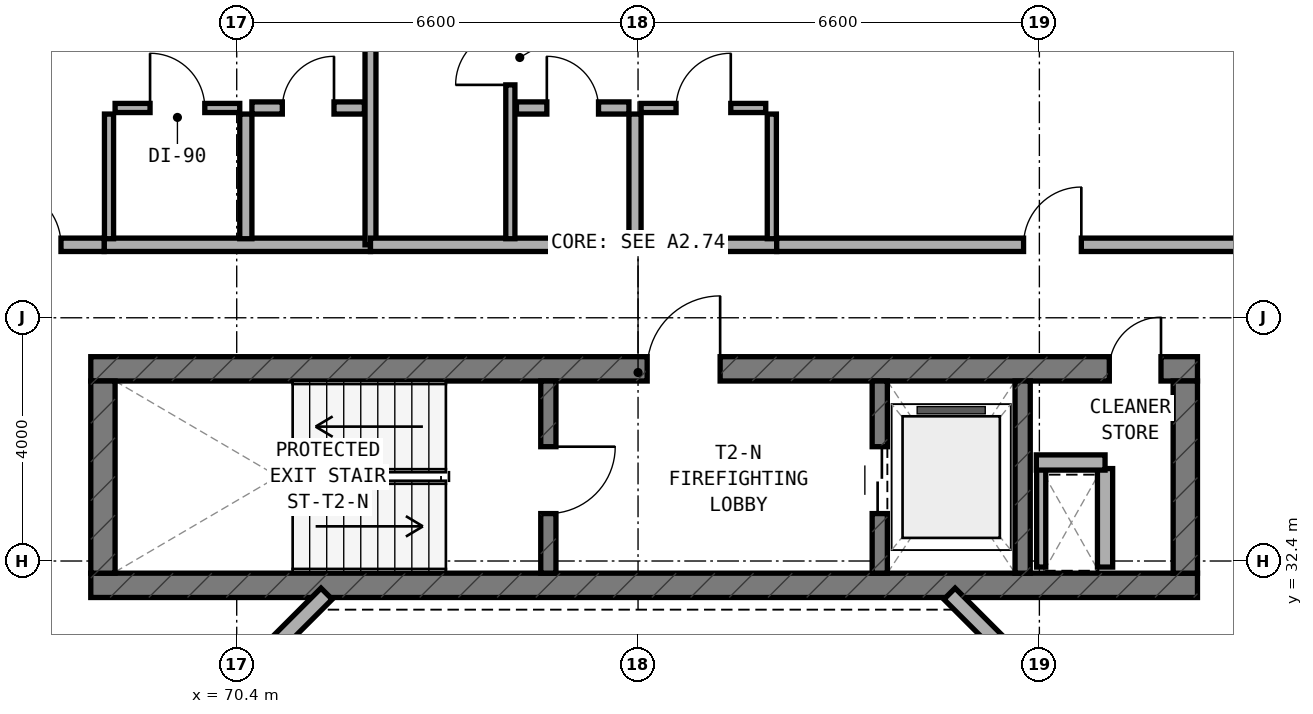
"""IFC4 building model, lengths in metres.
Left out: names, types, materials, properties, quantities, classifications, styles, units other than length and angle.
Written with IfcOpenShell. Run it as: python <this file> out.ifc"""

import sys

from ifc_helpers import new_model, si_unit, direction, frame, frame_2d, origin, place, context, subcontext, project, spatial, rectangle, extrude, element, fill, save


model = new_model("IFC4")
c1 = context("Model", 3, precision=1e-05, world=origin(), true_north=direction((0.0, 1.0)))
c2 = subcontext(c1, "Body", "Model", "MODEL_VIEW")
j1 = project(units=[si_unit("LENGTHUNIT", "METRE"), si_unit("PLANEANGLEUNIT", "RADIAN")], contexts=[c1])
p1 = place(None, origin())
s1 = spatial("IfcSite", under=j1, at=p1, CompositionType="ELEMENT")
p2 = place(p1, origin())
s2 = spatial("IfcBuilding", under=s1, at=p2, CompositionType="ELEMENT")
p3 = place(p2, frame((0.0, 0.0, 112.5)))
s3 = spatial("IfcBuildingStorey", under=s2, at=p3, CompositionType="ELEMENT", Elevation=112.5)
p4 = place(p3, frame((68.0, 32.0, 0.0), z_axis=(0.0, 0.0, 1.0), x_axis=(1.0, 0.0, 0.0)))
e1 = element("IfcWall", 1, at=p4, inside=s3, PredefinedType="SHEAR", context=c2, shape_type="SweptSolid", body=[
    extrude(rectangle(XDim=18.2, YDim=0.4, at=frame_2d((9.1, 0.0))), origin(), (0.0, 0.0, 1.0), 3.5),
])
p5 = place(p3, frame((68.0, 35.56, 0.0), z_axis=(0.0, 0.0, 1.0), x_axis=(1.0, 0.0, 0.0)))
e2 = element("IfcWall", 2, at=p5, inside=s3, PredefinedType="SHEAR", context=c2, shape_type="SweptSolid", body=[
    extrude(rectangle(XDim=18.2, YDim=0.4, at=frame_2d((9.1, 0.0))), origin(), (0.0, 0.0, 1.0), 3.5),
])
p6 = place(p5, frame((9.15, 0.0, 0.0)))
e3 = element("IfcOpeningElement", 3, at=p6, cuts=e2, PredefinedType="OPENING", context=c2, shape_type="SweptSolid", body=[
    extrude(rectangle(XDim=1.2, YDim=2.15, at=frame_2d((0.6, 1.075))), frame((0.0, 0.21, 0.0), z_axis=(0.0, -1.0, 0.0), x_axis=(1.0, 0.0, 0.0)), (0.0, 0.0, 1.0), 0.42),
])
p7 = place(p5, frame((16.75, 0.0, 0.0)))
e4 = element("IfcOpeningElement", 4, at=p7, cuts=e2, PredefinedType="OPENING", context=c2, shape_type="SweptSolid", body=[
    extrude(rectangle(XDim=0.85, YDim=2.1, at=frame_2d((0.425, 1.05))), frame((0.0, 0.21, 0.0), z_axis=(0.0, -1.0, 0.0), x_axis=(1.0, 0.0, 0.0)), (0.0, 0.0, 1.0), 0.42),
])
for number, where, z_axis, x_axis in (
    (5, (68.2, 32.2, 0.0), (0.0, 0.0, 1.0), (0.0, 1.0, 0.0)),
    (6, (86.0, 32.2, 0.0), (0.0, 0.0, 1.0), (0.0, 1.0, 0.0)),
):
    element("IfcWall", number, at=place(p3, frame(where, z_axis=z_axis, x_axis=x_axis)), inside=s3, PredefinedType="SHEAR", context=c2, shape_type="SweptSolid", body=[
        extrude(rectangle(XDim=3.16, YDim=0.4, at=frame_2d((1.58, 0.0))), origin(), (0.0, 0.0, 1.0), 3.5),
    ])
p8 = place(p3, frame((75.525, 32.2, 0.0), z_axis=(0.0, 0.0, 1.0), x_axis=(0.0, 1.0, 0.0)))
e7 = element("IfcWall", 7, at=p8, inside=s3, PredefinedType="STANDARD", context=c2, shape_type="SweptSolid", body=[
    extrude(rectangle(XDim=3.16, YDim=0.25, at=frame_2d((1.58, 0.0))), origin(), (0.0, 0.0, 1.0), 3.25),
])
p9 = place(p8, frame((0.98, 0.0, 0.0)))
e8 = element("IfcOpeningElement", 8, at=p9, cuts=e7, PredefinedType="OPENING", context=c2, shape_type="SweptSolid", body=[
    extrude(rectangle(XDim=1.1, YDim=2.15, at=frame_2d((0.55, 1.075))), frame((0.0, 0.135, 0.0), z_axis=(0.0, -1.0, 0.0), x_axis=(1.0, 0.0, 0.0)), (0.0, 0.0, 1.0), 0.27),
])
p10 = place(p3, frame((80.975, 32.2, 0.0), z_axis=(0.0, 0.0, 1.0), x_axis=(0.0, 1.0, 0.0)))
e9 = element("IfcWall", 9, at=p10, inside=s3, PredefinedType="STANDARD", context=c2, shape_type="SweptSolid", body=[
    extrude(rectangle(XDim=3.16, YDim=0.25, at=frame_2d((1.58, 0.0))), origin(), (0.0, 0.0, 1.0), 3.25),
])
p11 = place(p10, frame((0.98, 0.0, 0.0)))
e10 = element("IfcOpeningElement", 10, at=p11, cuts=e9, PredefinedType="OPENING", context=c2, shape_type="SweptSolid", body=[
    extrude(rectangle(XDim=1.1, YDim=2.15, at=frame_2d((0.55, 1.075))), frame((0.0, 0.135, 0.0), z_axis=(0.0, -1.0, 0.0), x_axis=(1.0, 0.0, 0.0)), (0.0, 0.0, 1.0), 0.27),
])
p12 = place(p3, frame((83.325, 32.2, 0.0), z_axis=(0.0, 0.0, 1.0), x_axis=(0.0, 1.0, 0.0)))
e11 = element("IfcWall", 11, at=p12, inside=s3, PredefinedType="STANDARD", context=c2, shape_type="SweptSolid", body=[
    extrude(rectangle(XDim=3.16, YDim=0.25, at=frame_2d((1.58, 0.0))), origin(), (0.0, 0.0, 1.0), 3.25),
])
for number, where, z_axis, x_axis in (
    (12, (83.756, 30.228, 0.0), (0.0, 0.0, 1.0), (-0.707, 0.707, 0.0)),
    (13, (71.878, 31.862, 0.0), (0.0, 0.0, 1.0), (-0.707, -0.707, 0.0)),
):
    element("IfcWall", number, at=place(p3, frame(where, z_axis=z_axis, x_axis=x_axis)), inside=s3, PredefinedType="STANDARD", context=c2, shape_type="SweptSolid", body=[
        extrude(rectangle(XDim=2.311, YDim=0.26, at=frame_2d((1.155, 0.0))), origin(), (0.0, 0.0, 1.0), 3.25),
    ])
p13 = place(p3, frame((83.63, 32.3, 0.0), z_axis=(0.0, 0.0, 1.0), x_axis=(0.0, 1.0, 0.0)))
e14 = element("IfcWall", 14, at=p13, inside=s3, PredefinedType="PARTITIONING", context=c2, shape_type="SweptSolid", body=[
    extrude(rectangle(XDim=1.62, YDim=0.15, at=frame_2d((0.81, 0.0))), origin(), (0.0, 0.0, 1.0), 2.825),
])
p14 = place(p3, frame((84.68, 32.3, 0.0), z_axis=(0.0, 0.0, 1.0), x_axis=(0.0, 1.0, 0.0)))
e15 = element("IfcWall", 15, at=p14, inside=s3, PredefinedType="SOLIDWALL", context=c2, shape_type="SweptSolid", body=[
    extrude(rectangle(XDim=1.62, YDim=0.25, at=frame_2d((0.81, 0.0))), origin(), (0.0, 0.0, 1.0), 3.22),
])
p15 = place(p3, frame((83.55, 34.02, 0.0), z_axis=(0.0, 0.0, 1.0), x_axis=(1.0, 0.0, 0.0)))
e16 = element("IfcWall", 16, at=p15, inside=s3, PredefinedType="SOLIDWALL", context=c2, shape_type="SweptSolid", body=[
    extrude(rectangle(XDim=1.13, YDim=0.25, at=frame_2d((0.565, 0.0))), origin(), (0.0, 0.0, 1.0), 3.22),
])
p16 = place(p3, frame((68.22, 37.6, 0.0), z_axis=(0.0, 0.0, 1.0), x_axis=(1.0, 0.0, 0.0)))
e17 = element("IfcWall", 17, at=p16, inside=s3, PredefinedType="SOLIDWALL", context=c2, shape_type="SweptSolid", body=[
    extrude(rectangle(XDim=4.38, YDim=0.22, at=frame_2d((2.19, 0.0))), origin(), (0.0, 0.0, 1.0), 2.825),
])
p17 = place(p3, frame((65.85, 37.6, 0.0), z_axis=(0.0, 0.0, 1.0), x_axis=(1.0, 0.0, 0.0)))
e18 = element("IfcWall", 18, at=p17, inside=s3, PredefinedType="SOLIDWALL", context=c2, shape_type="SweptSolid", body=[
    extrude(rectangle(XDim=2.37, YDim=0.22, at=frame_2d((1.185, 0.0))), origin(), (0.0, 0.0, 1.0), 3.22),
])
p18 = place(p17, frame((0.71, 0.0, 0.0)))
e19 = element("IfcOpeningElement", 19, at=p18, cuts=e18, PredefinedType="OPENING", context=c2, shape_type="SweptSolid", body=[
    extrude(rectangle(XDim=0.95, YDim=2.1, at=frame_2d((0.475, 1.05))), frame((0.0, 0.12, 0.0), z_axis=(0.0, -1.0, 0.0), x_axis=(1.0, 0.0, 0.0)), (0.0, 0.0, 1.0), 0.24),
])
p19 = place(p3, frame((70.55, 37.7, 0.0), z_axis=(0.0, 0.0, 1.0), x_axis=(0.0, 1.0, 0.0)))
e20 = element("IfcWall", 20, at=p19, inside=s3, PredefinedType="PLUMBINGWALL", context=c2, shape_type="SweptSolid", body=[
    extrude(rectangle(XDim=2.05, YDim=0.2, at=frame_2d((1.025, 0.0))), origin(), (0.0, 0.0, 1.0), 3.22),
])
p20 = place(p3, frame((68.3, 37.7, 0.0), z_axis=(0.0, 0.0, 1.0), x_axis=(0.0, 1.0, 0.0)))
e21 = element("IfcWall", 21, at=p20, inside=s3, PredefinedType="PARTITIONING", context=c2, shape_type="SweptSolid", body=[
    extrude(rectangle(XDim=2.05, YDim=0.15, at=frame_2d((1.025, 0.0))), origin(), (0.0, 0.0, 1.0), 3.22),
])
p21 = place(p3, frame((70.65, 39.85, 0.0), z_axis=(0.0, 0.0, 1.0), x_axis=(1.0, 0.0, 0.0)))
e22 = element("IfcWall", 22, at=p21, inside=s3, PredefinedType="PLUMBINGWALL", context=c2, shape_type="SweptSolid", body=[
    extrude(rectangle(XDim=1.85, YDim=0.2, at=frame_2d((0.925, 0.0))), origin(), (0.0, 0.0, 1.0), 3.22),
])
p22 = place(p21, frame((0.5, 0.0, 0.0)))
e23 = element("IfcOpeningElement", 23, at=p22, cuts=e22, PredefinedType="OPENING", context=c2, shape_type="SweptSolid", body=[
    extrude(rectangle(XDim=0.85, YDim=2.1, at=frame_2d((0.425, 1.05))), frame((0.0, 0.11, 0.0), z_axis=(0.0, -1.0, 0.0), x_axis=(1.0, 0.0, 0.0)), (0.0, 0.0, 1.0), 0.22),
])
p23 = place(p3, frame((68.4, 39.85, 0.0), z_axis=(0.0, 0.0, 1.0), x_axis=(1.0, 0.0, 0.0)))
e24 = element("IfcWall", 24, at=p23, inside=s3, PredefinedType="PARTITIONING", context=c2, shape_type="SweptSolid", body=[
    extrude(rectangle(XDim=2.05, YDim=0.15, at=frame_2d((1.025, 0.0))), origin(), (0.0, 0.0, 1.0), 3.22),
])
p24 = place(p23, frame((0.575, 0.0, 0.0)))
e25 = element("IfcOpeningElement", 25, at=p24, cuts=e24, PredefinedType="OPENING", context=c2, shape_type="SweptSolid", body=[
    extrude(rectangle(XDim=0.9, YDim=2.1, at=frame_2d((0.45, 1.05))), frame((0.0, 0.085, 0.0), z_axis=(0.0, -1.0, 0.0), x_axis=(1.0, 0.0, 0.0)), (0.0, 0.0, 1.0), 0.17),
])
p25 = place(p3, frame((72.6, 37.6, 0.0), z_axis=(0.0, 0.0, 1.0), x_axis=(0.0, 1.0, 0.0)))
e26 = element("IfcWall", 26, at=p25, inside=s3, PredefinedType="SOLIDWALL", context=c2, shape_type="SweptSolid", body=[
    extrude(rectangle(XDim=5.74, YDim=0.18, at=frame_2d((2.87, 0.0))), origin(), (0.0, 0.0, 1.0), 2.825),
])
p26 = place(p3, frame((72.6, 37.6, 0.0), z_axis=(0.0, 0.0, 1.0), x_axis=(1.0, 0.0, 0.0)))
e27 = element("IfcWall", 27, at=p26, inside=s3, PredefinedType="SOLIDWALL", context=c2, shape_type="SweptSolid", body=[
    extrude(rectangle(XDim=6.68, YDim=0.22, at=frame_2d((3.34, 0.0))), origin(), (0.0, 0.0, 1.0), 2.825),
])
p27 = place(p3, frame((79.28, 37.6, 0.0), z_axis=(0.0, 0.0, 1.0), x_axis=(1.0, 0.0, 0.0)))
e28 = element("IfcWall", 28, at=p27, inside=s3, PredefinedType="SOLIDWALL", context=c2, shape_type="SweptSolid", body=[
    extrude(rectangle(XDim=9.07, YDim=0.22, at=frame_2d((4.535, 0.0))), origin(), (0.0, 0.0, 1.0), 2.825),
])
p28 = place(p27, frame((4.06, 0.0, 0.0)))
e29 = element("IfcOpeningElement", 29, at=p28, cuts=e28, PredefinedType="OPENING", context=c2, shape_type="SweptSolid", body=[
    extrude(rectangle(XDim=0.95, YDim=2.1, at=frame_2d((0.475, 1.05))), frame((0.0, 0.12, 0.0), z_axis=(0.0, -1.0, 0.0), x_axis=(1.0, 0.0, 0.0)), (0.0, 0.0, 1.0), 0.24),
])
p29 = place(p3, frame((74.9, 37.7, 0.0), z_axis=(0.0, 0.0, 1.0), x_axis=(0.0, 1.0, 0.0)))
e30 = element("IfcWall", 30, at=p29, inside=s3, PredefinedType="PARTITIONING", context=c2, shape_type="SweptSolid", body=[
    extrude(rectangle(XDim=5.54, YDim=0.15, at=frame_2d((2.77, 0.0))), origin(), (0.0, 0.0, 1.0), 2.895),
])
p30 = place(p29, frame((2.53, 0.0, 0.0)))
e31 = element("IfcOpeningElement", 31, at=p30, cuts=e30, PredefinedType="OPENING", context=c2, shape_type="SweptSolid", body=[
    extrude(rectangle(XDim=0.9, YDim=2.1, at=frame_2d((0.45, 1.05))), frame((0.0, 0.085, 0.0), z_axis=(0.0, -1.0, 0.0), x_axis=(1.0, 0.0, 0.0)), (0.0, 0.0, 1.0), 0.17),
])
p31 = place(p3, frame((76.95, 37.7, 0.0), z_axis=(0.0, 0.0, 1.0), x_axis=(0.0, 1.0, 0.0)))
e32 = element("IfcWall", 32, at=p31, inside=s3, PredefinedType="PLUMBINGWALL", context=c2, shape_type="SweptSolid", body=[
    extrude(rectangle(XDim=2.05, YDim=0.2, at=frame_2d((1.025, 0.0))), origin(), (0.0, 0.0, 1.0), 2.895),
])
p32 = place(p3, frame((79.2, 37.7, 0.0), z_axis=(0.0, 0.0, 1.0), x_axis=(0.0, 1.0, 0.0)))
e33 = element("IfcWall", 33, at=p32, inside=s3, PredefinedType="PARTITIONING", context=c2, shape_type="SweptSolid", body=[
    extrude(rectangle(XDim=2.05, YDim=0.15, at=frame_2d((1.025, 0.0))), origin(), (0.0, 0.0, 1.0), 2.895),
])
p33 = place(p3, frame((75.0, 39.85, 0.0), z_axis=(0.0, 0.0, 1.0), x_axis=(1.0, 0.0, 0.0)))
e34 = element("IfcWall", 34, at=p33, inside=s3, PredefinedType="PLUMBINGWALL", context=c2, shape_type="SweptSolid", body=[
    extrude(rectangle(XDim=1.85, YDim=0.2, at=frame_2d((0.925, 0.0))), origin(), (0.0, 0.0, 1.0), 3.22),
])
p34 = place(p33, frame((0.5, 0.0, 0.0)))
e35 = element("IfcOpeningElement", 35, at=p34, cuts=e34, PredefinedType="OPENING", context=c2, shape_type="SweptSolid", body=[
    extrude(rectangle(XDim=0.85, YDim=2.1, at=frame_2d((0.425, 1.05))), frame((0.0, 0.11, 0.0), z_axis=(0.0, -1.0, 0.0), x_axis=(1.0, 0.0, 0.0)), (0.0, 0.0, 1.0), 0.22),
])
p35 = place(p3, frame((77.05, 39.85, 0.0), z_axis=(0.0, 0.0, 1.0), x_axis=(1.0, 0.0, 0.0)))
e36 = element("IfcWall", 36, at=p35, inside=s3, PredefinedType="PARTITIONING", context=c2, shape_type="SweptSolid", body=[
    extrude(rectangle(XDim=2.05, YDim=0.15, at=frame_2d((1.025, 0.0))), origin(), (0.0, 0.0, 1.0), 3.22),
])
p36 = place(p35, frame((0.575, 0.0, 0.0)))
e37 = element("IfcOpeningElement", 37, at=p36, cuts=e36, PredefinedType="OPENING", context=c2, shape_type="SweptSolid", body=[
    extrude(rectangle(XDim=0.9, YDim=2.1, at=frame_2d((0.45, 1.05))), frame((0.0, 0.085, 0.0), z_axis=(0.0, -1.0, 0.0), x_axis=(1.0, 0.0, 0.0)), (0.0, 0.0, 1.0), 0.17),
])
p37 = place(p9, frame((1.1, 0.0, 0.0), z_axis=(0.0, 0.0, 1.0), x_axis=(-1.0, 0.0, 0.0)))
e38 = element("IfcDoor", 38, at=p37, inside=s3, OperationType="SINGLE_SWING_LEFT", PredefinedType="DOOR", context=c2, shape_type="SweptSolid", body=[
    extrude(rectangle(XDim=1.1, YDim=2.15, at=frame_2d((0.55, 1.075))), frame((0.0, 0.025, 0.0), z_axis=(0.0, -1.0, 0.0), x_axis=(1.0, 0.0, 0.0)), (0.0, 0.0, 1.0), 0.05),
])
fill(e8, e38)
p38 = place(p6, origin())
e39 = element("IfcDoor", 39, at=p38, inside=s3, OperationType="SINGLE_SWING_RIGHT", PredefinedType="DOOR", context=c2, shape_type="SweptSolid", body=[
    extrude(rectangle(XDim=1.2, YDim=2.15, at=frame_2d((0.6, 1.075))), frame((0.0, 0.025, 0.0), z_axis=(0.0, -1.0, 0.0), x_axis=(1.0, 0.0, 0.0)), (0.0, 0.0, 1.0), 0.05),
])
fill(e3, e39)
p39 = place(p11, origin())
e40 = element("IfcDoor", 40, at=p39, inside=s3, OperationType="DOUBLE_DOOR_SLIDING", PredefinedType="DOOR", context=c2, shape_type="SweptSolid", body=[
    extrude(rectangle(XDim=1.1, YDim=2.15, at=frame_2d((0.55, 1.075))), frame((0.0, 0.025, 0.0), z_axis=(0.0, -1.0, 0.0), x_axis=(1.0, 0.0, 0.0)), (0.0, 0.0, 1.0), 0.05),
])
fill(e10, e40)
p40 = place(p7, origin())
e41 = element("IfcDoor", 41, at=p40, inside=s3, OperationType="SINGLE_SWING_RIGHT", PredefinedType="DOOR", context=c2, shape_type="SweptSolid", body=[
    extrude(rectangle(XDim=0.85, YDim=2.1, at=frame_2d((0.425, 1.05))), frame((0.0, 0.025, 0.0), z_axis=(0.0, -1.0, 0.0), x_axis=(1.0, 0.0, 0.0)), (0.0, 0.0, 1.0), 0.05),
])
fill(e4, e41)
p41 = place(p18, origin())
e42 = element("IfcDoor", 42, at=p41, inside=s3, OperationType="SINGLE_SWING_LEFT", PredefinedType="DOOR", context=c2, shape_type="SweptSolid", body=[
    extrude(rectangle(XDim=0.95, YDim=2.1, at=frame_2d((0.475, 1.05))), frame((0.0, 0.025, 0.0), z_axis=(0.0, -1.0, 0.0), x_axis=(1.0, 0.0, 0.0)), (0.0, 0.0, 1.0), 0.05),
])
fill(e19, e42)
p42 = place(p22, origin())
e43 = element("IfcDoor", 43, at=p42, inside=s3, OperationType="SINGLE_SWING_RIGHT", PredefinedType="DOOR", context=c2, shape_type="SweptSolid", body=[
    extrude(rectangle(XDim=0.85, YDim=2.1, at=frame_2d((0.425, 1.05))), frame((0.0, 0.025, 0.0), z_axis=(0.0, -1.0, 0.0), x_axis=(1.0, 0.0, 0.0)), (0.0, 0.0, 1.0), 0.05),
])
fill(e23, e43)
p43 = place(p24, origin())
e44 = element("IfcDoor", 44, at=p43, inside=s3, OperationType="SINGLE_SWING_LEFT", PredefinedType="DOOR", context=c2, shape_type="SweptSolid", body=[
    extrude(rectangle(XDim=0.9, YDim=2.1, at=frame_2d((0.45, 1.05))), frame((0.0, 0.025, 0.0), z_axis=(0.0, -1.0, 0.0), x_axis=(1.0, 0.0, 0.0)), (0.0, 0.0, 1.0), 0.05),
])
fill(e25, e44)
p44 = place(p28, origin())
e45 = element("IfcDoor", 45, at=p44, inside=s3, OperationType="SINGLE_SWING_RIGHT", PredefinedType="DOOR", context=c2, shape_type="SweptSolid", body=[
    extrude(rectangle(XDim=0.95, YDim=2.1, at=frame_2d((0.475, 1.05))), frame((0.0, 0.025, 0.0), z_axis=(0.0, -1.0, 0.0), x_axis=(1.0, 0.0, 0.0)), (0.0, 0.0, 1.0), 0.05),
])
fill(e29, e45)
p45 = place(p30, origin())
e46 = element("IfcDoor", 46, at=p45, inside=s3, OperationType="SINGLE_SWING_LEFT", PredefinedType="DOOR", context=c2, shape_type="SweptSolid", body=[
    extrude(rectangle(XDim=0.9, YDim=2.1, at=frame_2d((0.45, 1.05))), frame((0.0, 0.025, 0.0), z_axis=(0.0, -1.0, 0.0), x_axis=(1.0, 0.0, 0.0)), (0.0, 0.0, 1.0), 0.05),
])
fill(e31, e46)
p46 = place(p34, origin())
e47 = element("IfcDoor", 47, at=p46, inside=s3, OperationType="SINGLE_SWING_LEFT", PredefinedType="DOOR", context=c2, shape_type="SweptSolid", body=[
    extrude(rectangle(XDim=0.85, YDim=2.1, at=frame_2d((0.425, 1.05))), frame((0.0, 0.025, 0.0), z_axis=(0.0, -1.0, 0.0), x_axis=(1.0, 0.0, 0.0)), (0.0, 0.0, 1.0), 0.05),
])
fill(e35, e47)
p47 = place(p36, origin())
e48 = element("IfcDoor", 48, at=p47, inside=s3, OperationType="SINGLE_SWING_RIGHT", PredefinedType="DOOR", context=c2, shape_type="SweptSolid", body=[
    extrude(rectangle(XDim=0.9, YDim=2.1, at=frame_2d((0.45, 1.05))), frame((0.0, 0.025, 0.0), z_axis=(0.0, -1.0, 0.0), x_axis=(1.0, 0.0, 0.0)), (0.0, 0.0, 1.0), 0.05),
])
fill(e37, e48)
save(model, sys.argv[1])
